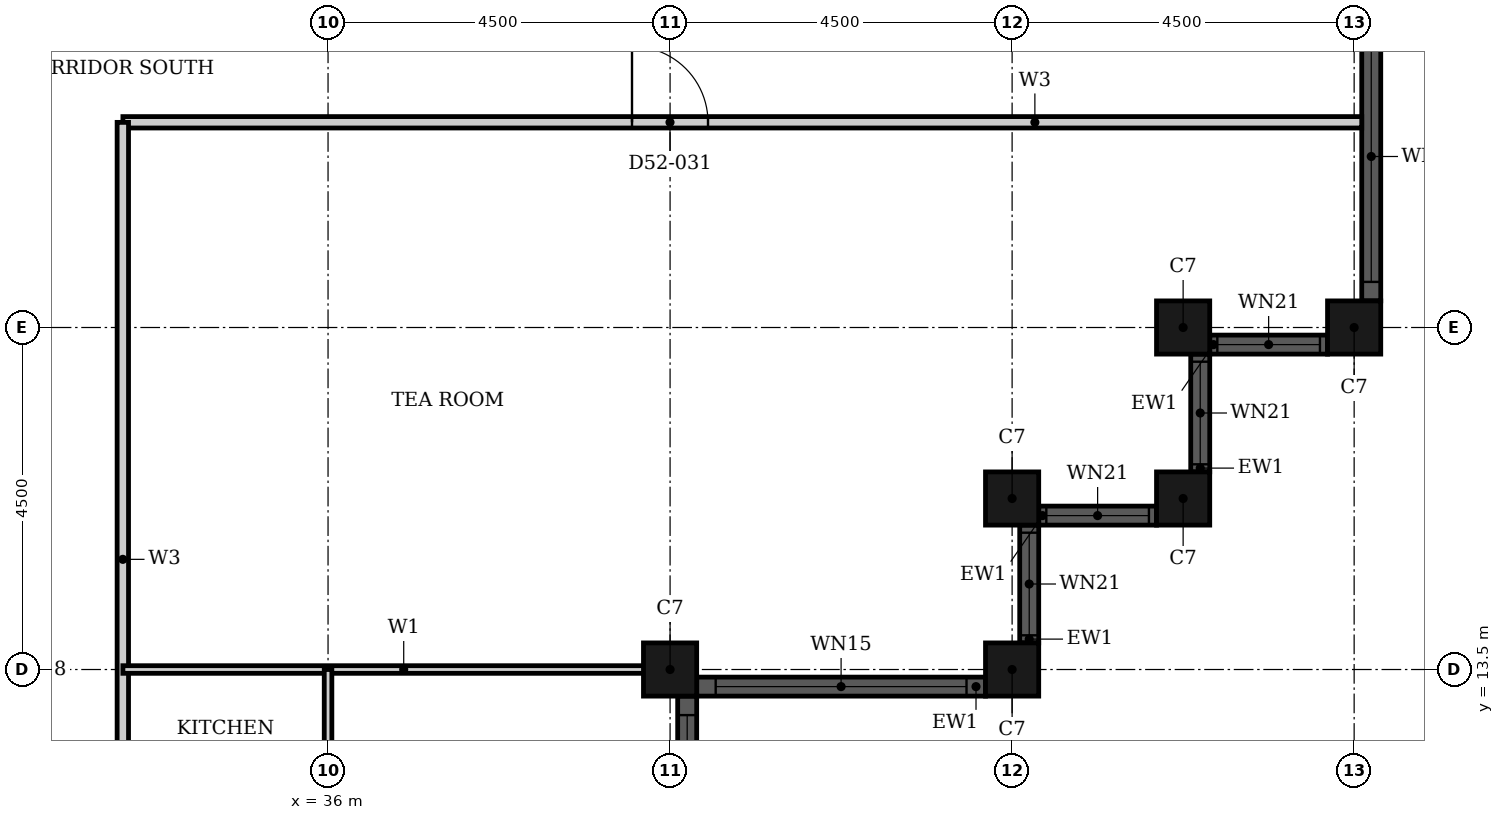
"""IFC4 building model, lengths in metres.
Left out: names, types, materials, properties, quantities, classifications, styles, units other than length and angle.
Written with IfcOpenShell. Run it as: python <this file> out.ifc"""

import sys

from ifc_helpers import new_model, si_unit, direction, frame, frame_2d, origin, origin_2d, place, context, subcontext, project, spatial, rectangle, hollow_rectangle, extrude, element, fill, save


model = new_model("IFC4")
c1 = context("Model", 3, precision=1e-05, world=origin(), true_north=direction((0.0, 1.0)))
c2 = subcontext(c1, "Body", "Model", "MODEL_VIEW")
j1 = project(units=[si_unit("LENGTHUNIT", "METRE"), si_unit("PLANEANGLEUNIT", "RADIAN")], contexts=[c1])
p1 = place(None, origin())
s1 = spatial("IfcSite", under=j1, at=p1, CompositionType="ELEMENT")
p2 = place(p1, origin())
s2 = spatial("IfcBuilding", under=s1, at=p2, CompositionType="ELEMENT")
p3 = place(p2, frame((0.0, 0.0, 207.2)))
s3 = spatial("IfcBuildingStorey", under=s2, at=p3, CompositionType="ELEMENT", Elevation=207.2)
for number, where, z_axis, x_axis in (
    (1, (40.5, 13.5, 0.0), (0.0, 0.0, 1.0), (1.0, 0.0, 0.0)),
    (2, (45.0, 13.5, 0.0), (0.0, 0.0, 1.0), (1.0, 0.0, 0.0)),
    (3, (45.0, 15.75, 0.0), (0.0, 0.0, 1.0), (1.0, 0.0, 0.0)),
    (4, (47.25, 15.75, 0.0), (0.0, 0.0, 1.0), (1.0, 0.0, 0.0)),
    (5, (47.25, 18.0, 0.0), (0.0, 0.0, 1.0), (1.0, 0.0, 0.0)),
    (6, (49.5, 18.0, 0.0), (0.0, 0.0, 1.0), (1.0, 0.0, 0.0)),
):
    element("IfcColumn", number, at=place(p3, frame(where, z_axis=z_axis, x_axis=x_axis)), inside=s3, PredefinedType="COLUMN", context=c2, shape_type="SweptSolid", body=[
        extrude(hollow_rectangle(XDim=0.7, YDim=0.7, WallThickness=0.022, at=origin_2d()), origin(), (0.0, 0.0, 1.0), 3.7),
    ])
p4 = place(p3, frame((40.85, 13.275, 0.0), z_axis=(0.0, 0.0, 1.0), x_axis=(1.0, 0.0, 0.0)))
e7 = element("IfcWall", 7, at=p4, inside=s3, PredefinedType="SOLIDWALL", context=c2, shape_type="SweptSolid", body=[
    extrude(rectangle(XDim=3.8, YDim=0.25, at=frame_2d((1.9, 0.0))), origin(), (0.0, 0.0, 1.0), 3.7),
])
p5 = place(p4, frame((0.25, 0.0, 0.45)))
e8 = element("IfcOpeningElement", 8, at=p5, cuts=e7, PredefinedType="OPENING", context=c2, shape_type="SweptSolid", body=[
    extrude(rectangle(XDim=3.3, YDim=2.3, at=frame_2d((1.65, 1.15))), frame((0.0, 0.135, 0.0), z_axis=(0.0, -1.0, 0.0), x_axis=(1.0, 0.0, 0.0)), (0.0, 0.0, 1.0), 0.27),
])
p6 = place(p3, frame((45.225, 13.85, 0.0), z_axis=(0.0, 0.0, 1.0), x_axis=(0.0, 1.0, 0.0)))
e9 = element("IfcWall", 9, at=p6, inside=s3, PredefinedType="SOLIDWALL", context=c2, shape_type="SweptSolid", body=[
    extrude(rectangle(XDim=1.55, YDim=0.25, at=frame_2d((0.775, 0.0))), origin(), (0.0, 0.0, 1.0), 3.7),
])
p7 = place(p6, frame((0.1, 0.0, 0.9)))
e10 = element("IfcOpeningElement", 10, at=p7, cuts=e9, PredefinedType="OPENING", context=c2, shape_type="SweptSolid", body=[
    extrude(rectangle(XDim=1.35, YDim=1.85, at=frame_2d((0.675, 0.925))), frame((0.0, 0.135, 0.0), z_axis=(0.0, -1.0, 0.0), x_axis=(1.0, 0.0, 0.0)), (0.0, 0.0, 1.0), 0.27),
])
p8 = place(p3, frame((45.35, 15.525, 0.0), z_axis=(0.0, 0.0, 1.0), x_axis=(1.0, 0.0, 0.0)))
e11 = element("IfcWall", 11, at=p8, inside=s3, PredefinedType="SOLIDWALL", context=c2, shape_type="SweptSolid", body=[
    extrude(rectangle(XDim=1.55, YDim=0.25, at=frame_2d((0.775, 0.0))), origin(), (0.0, 0.0, 1.0), 3.7),
])
p9 = place(p8, frame((0.1, 0.0, 0.9)))
e12 = element("IfcOpeningElement", 12, at=p9, cuts=e11, PredefinedType="OPENING", context=c2, shape_type="SweptSolid", body=[
    extrude(rectangle(XDim=1.35, YDim=1.85, at=frame_2d((0.675, 0.925))), frame((0.0, 0.135, 0.0), z_axis=(0.0, -1.0, 0.0), x_axis=(1.0, 0.0, 0.0)), (0.0, 0.0, 1.0), 0.27),
])
p10 = place(p3, frame((47.475, 16.1, 0.0), z_axis=(0.0, 0.0, 1.0), x_axis=(0.0, 1.0, 0.0)))
e13 = element("IfcWall", 13, at=p10, inside=s3, PredefinedType="SOLIDWALL", context=c2, shape_type="SweptSolid", body=[
    extrude(rectangle(XDim=1.55, YDim=0.25, at=frame_2d((0.775, 0.0))), origin(), (0.0, 0.0, 1.0), 3.7),
])
p11 = place(p10, frame((0.1, 0.0, 0.9)))
e14 = element("IfcOpeningElement", 14, at=p11, cuts=e13, PredefinedType="OPENING", context=c2, shape_type="SweptSolid", body=[
    extrude(rectangle(XDim=1.35, YDim=1.85, at=frame_2d((0.675, 0.925))), frame((0.0, 0.135, 0.0), z_axis=(0.0, -1.0, 0.0), x_axis=(1.0, 0.0, 0.0)), (0.0, 0.0, 1.0), 0.27),
])
p12 = place(p3, frame((47.6, 17.775, 0.0), z_axis=(0.0, 0.0, 1.0), x_axis=(1.0, 0.0, 0.0)))
e15 = element("IfcWall", 15, at=p12, inside=s3, PredefinedType="SOLIDWALL", context=c2, shape_type="SweptSolid", body=[
    extrude(rectangle(XDim=1.55, YDim=0.25, at=frame_2d((0.775, 0.0))), origin(), (0.0, 0.0, 1.0), 3.7),
])
p13 = place(p12, frame((0.1, 0.0, 0.9)))
e16 = element("IfcOpeningElement", 16, at=p13, cuts=e15, PredefinedType="OPENING", context=c2, shape_type="SweptSolid", body=[
    extrude(rectangle(XDim=1.35, YDim=1.85, at=frame_2d((0.675, 0.925))), frame((0.0, 0.135, 0.0), z_axis=(0.0, -1.0, 0.0), x_axis=(1.0, 0.0, 0.0)), (0.0, 0.0, 1.0), 0.27),
])
p14 = place(p3, frame((49.725, 18.35, 0.0), z_axis=(0.0, 0.0, 1.0), x_axis=(0.0, 1.0, 0.0)))
e17 = element("IfcWall", 17, at=p14, inside=s3, PredefinedType="SOLIDWALL", context=c2, shape_type="SweptSolid", body=[
    extrude(rectangle(XDim=8.3, YDim=0.25, at=frame_2d((4.15, 0.0))), origin(), (0.0, 0.0, 1.0), 3.7),
])
p15 = place(p14, frame((0.25, 0.0, 0.45)))
e18 = element("IfcOpeningElement", 18, at=p15, cuts=e17, PredefinedType="OPENING", context=c2, shape_type="SweptSolid", body=[
    extrude(rectangle(XDim=3.3, YDim=2.3, at=frame_2d((1.65, 1.15))), frame((0.0, 0.135, 0.0), z_axis=(0.0, -1.0, 0.0), x_axis=(1.0, 0.0, 0.0)), (0.0, 0.0, 1.0), 0.27),
])
p16 = place(p14, frame((4.75, 0.0, 0.45)))
e19 = element("IfcOpeningElement", 19, at=p16, cuts=e17, PredefinedType="OPENING", context=c2, shape_type="SweptSolid", body=[
    extrude(rectangle(XDim=3.3, YDim=2.3, at=frame_2d((1.65, 1.15))), frame((0.0, 0.135, 0.0), z_axis=(0.0, -1.0, 0.0), x_axis=(1.0, 0.0, 0.0)), (0.0, 0.0, 1.0), 0.27),
])
p17 = place(p3, frame((40.725, 4.85, 0.0), z_axis=(0.0, 0.0, 1.0), x_axis=(0.0, 1.0, 0.0)))
e20 = element("IfcWall", 20, at=p17, inside=s3, PredefinedType="SOLIDWALL", context=c2, shape_type="SweptSolid", body=[
    extrude(rectangle(XDim=8.3, YDim=0.25, at=frame_2d((4.15, 0.0))), origin(), (0.0, 0.0, 1.0), 3.7),
])
p18 = place(p17, frame((0.25, 0.0, 0.45)))
e21 = element("IfcOpeningElement", 21, at=p18, cuts=e20, PredefinedType="OPENING", context=c2, shape_type="SweptSolid", body=[
    extrude(rectangle(XDim=3.3, YDim=2.3, at=frame_2d((1.65, 1.15))), frame((0.0, 0.135, 0.0), z_axis=(0.0, -1.0, 0.0), x_axis=(1.0, 0.0, 0.0)), (0.0, 0.0, 1.0), 0.27),
])
p19 = place(p17, frame((4.75, 0.0, 0.45)))
e22 = element("IfcOpeningElement", 22, at=p19, cuts=e20, PredefinedType="OPENING", context=c2, shape_type="SweptSolid", body=[
    extrude(rectangle(XDim=3.3, YDim=2.3, at=frame_2d((1.65, 1.15))), frame((0.0, 0.135, 0.0), z_axis=(0.0, -1.0, 0.0), x_axis=(1.0, 0.0, 0.0)), (0.0, 0.0, 1.0), 0.27),
])
p20 = place(p3, frame((33.301, 20.7, 0.0), z_axis=(0.0, 0.0, 1.0), x_axis=(1.0, 0.0, 0.0)))
e23 = element("IfcWall", 23, at=p20, inside=s3, PredefinedType="PARTITIONING", context=c2, shape_type="SweptSolid", body=[
    extrude(rectangle(XDim=16.299, YDim=0.15, at=frame_2d((8.149, 0.0))), origin(), (0.0, 0.0, 1.0), 3.4),
])
p21 = place(p20, frame((6.698, 0.0, 0.0)))
e24 = element("IfcOpeningElement", 24, at=p21, cuts=e23, PredefinedType="OPENING", context=c2, shape_type="SweptSolid", body=[
    extrude(rectangle(XDim=1.0, YDim=2.1, at=frame_2d((0.5, 1.05))), frame((0.0, 0.085, 0.0), z_axis=(0.0, -1.0, 0.0), x_axis=(1.0, 0.0, 0.0)), (0.0, 0.0, 1.0), 0.17),
])
p22 = place(p3, frame((33.3, 6.9, 0.0), z_axis=(0.0, 0.0, 1.0), x_axis=(0.0, 1.0, 0.0)))
e25 = element("IfcWall", 25, at=p22, inside=s3, PredefinedType="PARTITIONING", context=c2, shape_type="SweptSolid", body=[
    extrude(rectangle(XDim=13.799, YDim=0.15, at=frame_2d((6.899, 0.0))), origin(), (0.0, 0.0, 1.0), 3.4),
])
p23 = place(p22, frame((1.3, 0.0, 0.0)))
e26 = element("IfcOpeningElement", 26, at=p23, cuts=e25, PredefinedType="OPENING", context=c2, shape_type="SweptSolid", body=[
    extrude(rectangle(XDim=1.0, YDim=2.2, at=frame_2d((0.5, 1.1))), frame((0.0, 0.085, 0.0), z_axis=(0.0, -1.0, 0.0), x_axis=(1.0, 0.0, 0.0)), (0.0, 0.0, 1.0), 0.17),
])
p24 = place(p3, frame((33.301, 13.5, 0.0), z_axis=(0.0, 0.0, 1.0), x_axis=(1.0, 0.0, 0.0)))
e27 = element("IfcWall", 27, at=p24, inside=s3, PredefinedType="PARTITIONING", context=c2, shape_type="SweptSolid", body=[
    extrude(rectangle(XDim=7.389, YDim=0.1, at=frame_2d((3.694, 0.0))), origin(), (0.0, 0.0, 1.0), 2.48),
])
p25 = place(p3, frame((36.0, 10.5, 0.0), z_axis=(0.0, 0.0, 1.0), x_axis=(0.0, 1.0, 0.0)))
e28 = element("IfcWall", 28, at=p25, inside=s3, PredefinedType="PARTITIONING", context=c2, shape_type="SweptSolid", body=[
    extrude(rectangle(XDim=3.0, YDim=0.1, at=frame_2d((1.5, 0.0))), origin(), (0.0, 0.0, 1.0), 2.68),
])
p26 = place(p25, frame((1.05, 0.0, 0.0)))
e29 = element("IfcOpeningElement", 29, at=p26, cuts=e28, PredefinedType="OPENING", context=c2, shape_type="SweptSolid", body=[
    extrude(rectangle(XDim=0.9, YDim=2.1, at=frame_2d((0.45, 1.05))), frame((0.0, 0.06, 0.0), z_axis=(0.0, -1.0, 0.0), x_axis=(1.0, 0.0, 0.0)), (0.0, 0.0, 1.0), 0.12),
])
p27 = place(p5, origin())
e30 = element("IfcWindow", 30, at=p27, inside=s3, PartitioningType="SINGLE_PANEL", PredefinedType="WINDOW", context=c2, shape_type="SweptSolid", body=[
    extrude(rectangle(XDim=3.3, YDim=2.3, at=frame_2d((1.65, 1.15))), frame((0.0, 0.03, 0.0), z_axis=(0.0, -1.0, 0.0), x_axis=(1.0, 0.0, 0.0)), (0.0, 0.0, 1.0), 0.06),
])
fill(e8, e30)
p28 = place(p7, origin())
e31 = element("IfcWindow", 31, at=p28, inside=s3, PartitioningType="SINGLE_PANEL", PredefinedType="WINDOW", context=c2, shape_type="SweptSolid", body=[
    extrude(rectangle(XDim=1.35, YDim=1.85, at=frame_2d((0.675, 0.925))), frame((0.0, 0.03, 0.0), z_axis=(0.0, -1.0, 0.0), x_axis=(1.0, 0.0, 0.0)), (0.0, 0.0, 1.0), 0.06),
])
fill(e10, e31)
p29 = place(p9, origin())
e32 = element("IfcWindow", 32, at=p29, inside=s3, PartitioningType="SINGLE_PANEL", PredefinedType="WINDOW", context=c2, shape_type="SweptSolid", body=[
    extrude(rectangle(XDim=1.35, YDim=1.85, at=frame_2d((0.675, 0.925))), frame((0.0, 0.03, 0.0), z_axis=(0.0, -1.0, 0.0), x_axis=(1.0, 0.0, 0.0)), (0.0, 0.0, 1.0), 0.06),
])
fill(e12, e32)
p30 = place(p11, origin())
e33 = element("IfcWindow", 33, at=p30, inside=s3, PartitioningType="SINGLE_PANEL", PredefinedType="WINDOW", context=c2, shape_type="SweptSolid", body=[
    extrude(rectangle(XDim=1.35, YDim=1.85, at=frame_2d((0.675, 0.925))), frame((0.0, 0.03, 0.0), z_axis=(0.0, -1.0, 0.0), x_axis=(1.0, 0.0, 0.0)), (0.0, 0.0, 1.0), 0.06),
])
fill(e14, e33)
p31 = place(p13, origin())
e34 = element("IfcWindow", 34, at=p31, inside=s3, PartitioningType="SINGLE_PANEL", PredefinedType="WINDOW", context=c2, shape_type="SweptSolid", body=[
    extrude(rectangle(XDim=1.35, YDim=1.85, at=frame_2d((0.675, 0.925))), frame((0.0, 0.03, 0.0), z_axis=(0.0, -1.0, 0.0), x_axis=(1.0, 0.0, 0.0)), (0.0, 0.0, 1.0), 0.06),
])
fill(e16, e34)
p32 = place(p15, origin())
e35 = element("IfcWindow", 35, at=p32, inside=s3, PartitioningType="SINGLE_PANEL", PredefinedType="WINDOW", context=c2, shape_type="SweptSolid", body=[
    extrude(rectangle(XDim=3.3, YDim=2.3, at=frame_2d((1.65, 1.15))), frame((0.0, 0.03, 0.0), z_axis=(0.0, -1.0, 0.0), x_axis=(1.0, 0.0, 0.0)), (0.0, 0.0, 1.0), 0.06),
])
fill(e18, e35)
p33 = place(p19, origin())
e36 = element("IfcWindow", 36, at=p33, inside=s3, PartitioningType="SINGLE_PANEL", PredefinedType="WINDOW", context=c2, shape_type="SweptSolid", body=[
    extrude(rectangle(XDim=3.3, YDim=2.3, at=frame_2d((1.65, 1.15))), frame((0.0, 0.03, 0.0), z_axis=(0.0, -1.0, 0.0), x_axis=(1.0, 0.0, 0.0)), (0.0, 0.0, 1.0), 0.06),
])
fill(e22, e36)
p34 = place(p21, origin())
e37 = element("IfcDoor", 37, at=p34, inside=s3, OperationType="SINGLE_SWING_LEFT", PredefinedType="DOOR", context=c2, shape_type="SweptSolid", body=[
    extrude(rectangle(XDim=1.0, YDim=2.1, at=frame_2d((0.5, 1.05))), frame((0.0, 0.025, 0.0), z_axis=(0.0, -1.0, 0.0), x_axis=(1.0, 0.0, 0.0)), (0.0, 0.0, 1.0), 0.05),
])
fill(e24, e37)
save(model, sys.argv[1])
